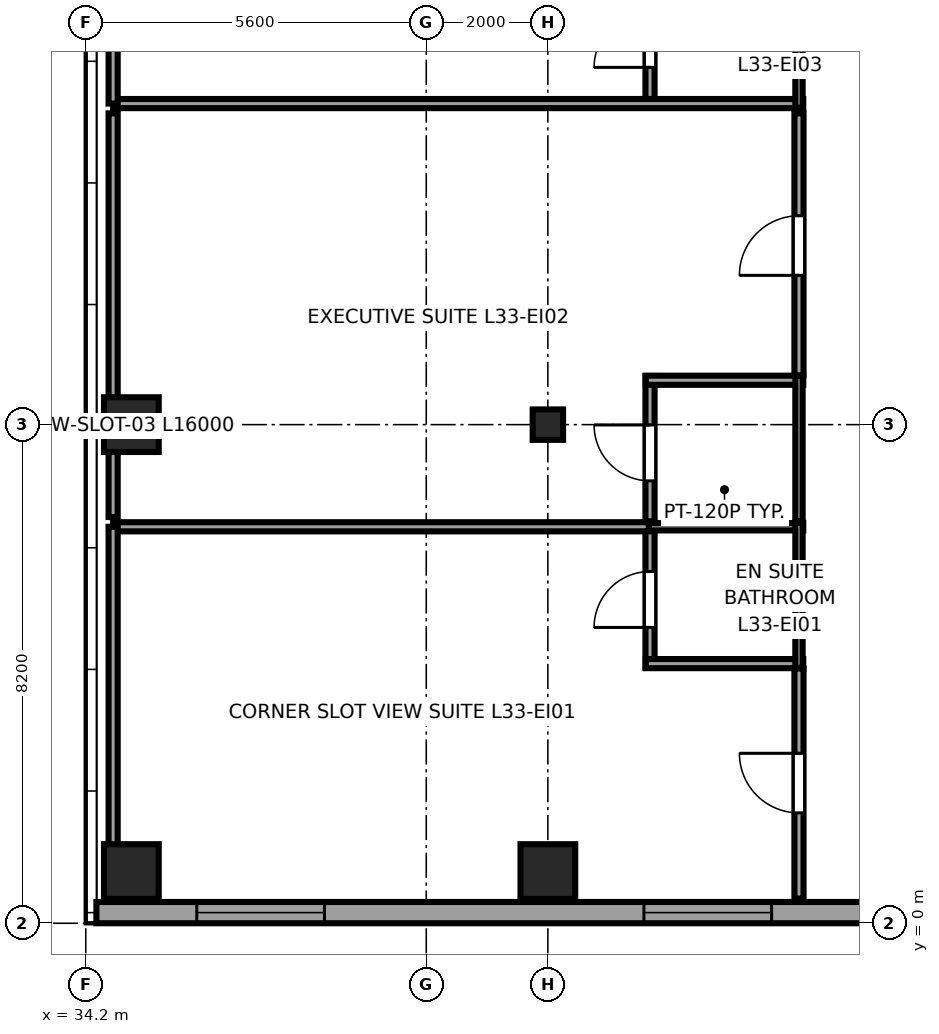
"""IFC4 building model, lengths in metres.
Left out: names, types, materials, properties, quantities, classifications, styles, units other than length and angle.
Written with IfcOpenShell. Run it as: python <this file> out.ifc"""

import sys

from ifc_helpers import new_model, si_unit, direction, frame, frame_2d, origin, origin_2d, place, context, subcontext, project, spatial, rectangle, i_section, extrude, source, transform, mapped, element, fill, save


model = new_model("IFC4")
c1 = context("Model", 3, precision=1e-05, world=origin(), true_north=direction((0.0, 1.0)))
c2 = subcontext(c1, "Body", "Model", "MODEL_VIEW")
j1 = project(units=[si_unit("LENGTHUNIT", "METRE"), si_unit("PLANEANGLEUNIT", "RADIAN")], contexts=[c1])
p1 = place(None, origin())
s1 = spatial("IfcSite", under=j1, at=p1, CompositionType="ELEMENT")
p2 = place(p1, origin())
s2 = spatial("IfcBuilding", under=s1, at=p2, CompositionType="ELEMENT")
p3 = place(p2, frame((0.0, 0.0, 129.3)))
s3 = spatial("IfcBuildingStorey", under=s2, at=p3, CompositionType="ELEMENT", Elevation=129.3)
m1 = source(origin(), c2, "Body", "SweptSolid", [
    extrude(rectangle(XDim=0.9, YDim=0.9, at=origin_2d()), origin(), (0.0, 0.0, 1.0), 3.55),
])
for number, where, z_axis, x_axis in (
    (1, (34.95, 0.85, 0.0), (0.0, 0.0, 1.0), (1.0, 0.0, 0.0)),
    (2, (34.95, 8.2, 0.0), (0.0, 0.0, 1.0), (1.0, 0.0, 0.0)),
    (3, (41.8, 0.85, 0.0), (0.0, 0.0, 1.0), (1.0, 0.0, 0.0)),
):
    element("IfcColumn", number, at=place(p3, frame(where, z_axis=z_axis, x_axis=x_axis)), inside=s3, PredefinedType="COLUMN", context=c2, shape_type="MappedRepresentation", body=[
        mapped(m1, transform((0.0, 0.0, 0.0), x_axis=(1.0, 0.0, 0.0), y_axis=(0.0, 1.0, 0.0), z_axis=(0.0, 0.0, 1.0), scale=1.0)),
    ])
m2 = source(origin(), c2, "Body", "SweptSolid", [
    extrude(i_section(OverallWidth=0.5, OverallDepth=0.5, WebThickness=0.022, FlangeThickness=0.034, at=origin_2d()), origin(), (0.0, 0.0, 1.0), 3.55),
])
p4 = place(p3, frame((41.8, 8.2, 0.0), z_axis=(0.0, 0.0, 1.0), x_axis=(1.0, 0.0, 0.0)))
e4 = element("IfcColumn", 4, at=p4, inside=s3, PredefinedType="COLUMN", context=c2, shape_type="MappedRepresentation", body=[
    mapped(m2, transform((0.0, 0.0, 0.0), x_axis=(1.0, 0.0, 0.0), y_axis=(0.0, 1.0, 0.0), z_axis=(0.0, 0.0, 1.0), scale=1.0)),
])
p5 = place(p3, frame((34.375, 0.175, 0.0), z_axis=(0.0, 0.0, 1.0), x_axis=(1.0, 0.0, 0.0)))
e5 = element("IfcWall", 5, at=p5, inside=s3, PredefinedType="SOLIDWALL", context=c2, shape_type="SweptSolid", body=[
    extrude(rectangle(XDim=18.008, YDim=0.35, at=frame_2d((9.004, 0.0))), origin(), (0.0, 0.0, 1.0), 3.37),
])
p6 = place(p5, frame((1.651, 0.0, 0.68)))
e6 = element("IfcOpeningElement", 6, at=p6, cuts=e5, PredefinedType="OPENING", context=c2, shape_type="SweptSolid", body=[
    extrude(rectangle(XDim=2.1, YDim=1.9, at=frame_2d((1.05, 0.95))), frame((0.0, 0.185, 0.0), z_axis=(0.0, -1.0, 0.0), x_axis=(1.0, 0.0, 0.0)), (0.0, 0.0, 1.0), 0.37),
])
p7 = place(p5, frame((9.005, 0.0, 0.68)))
e7 = element("IfcOpeningElement", 7, at=p7, cuts=e5, PredefinedType="OPENING", context=c2, shape_type="SweptSolid", body=[
    extrude(rectangle(XDim=2.1, YDim=1.9, at=frame_2d((1.05, 0.95))), frame((0.0, 0.185, 0.0), z_axis=(0.0, -1.0, 0.0), x_axis=(1.0, 0.0, 0.0)), (0.0, 0.0, 1.0), 0.37),
])
p8 = place(p5, frame((14.991, 0.0, 0.62)))
e8 = element("IfcOpeningElement", 8, at=p8, cuts=e5, PredefinedType="OPENING", context=c2, shape_type="SweptSolid", body=[
    extrude(rectangle(XDim=1.5, YDim=1.55, at=frame_2d((0.75, 0.775))), frame((0.0, 0.185, 0.0), z_axis=(0.0, -1.0, 0.0), x_axis=(1.0, 0.0, 0.0)), (0.0, 0.0, 1.0), 0.37),
])
p9 = place(p3, frame((43.48, 4.2, 0.0), z_axis=(0.0, 0.0, 1.0), x_axis=(0.0, 1.0, 0.0)))
e9 = element("IfcWall", 9, at=p9, inside=s3, PredefinedType="PARTITIONING", context=c2, shape_type="SweptSolid", body=[
    extrude(rectangle(XDim=2.39, YDim=0.15, at=frame_2d((1.195, 0.0))), origin(), (0.0, 0.0, 1.0), 3.37),
])
p10 = place(p9, frame((0.665, 0.0, 0.0)))
e10 = element("IfcOpeningElement", 10, at=p10, cuts=e9, PredefinedType="OPENING", context=c2, shape_type="SweptSolid", body=[
    extrude(rectangle(XDim=0.92, YDim=2.01, at=frame_2d((0.46, 1.005))), frame((0.0, 0.085, 0.0), z_axis=(0.0, -1.0, 0.0), x_axis=(1.0, 0.0, 0.0)), (0.0, 0.0, 1.0), 0.17),
])
p11 = place(p3, frame((43.41, 4.27, 0.0), z_axis=(0.0, 0.0, 1.0), x_axis=(1.0, 0.0, 0.0)))
e11 = element("IfcWall", 11, at=p11, inside=s3, PredefinedType="PARTITIONING", context=c2, shape_type="SweptSolid", body=[
    extrude(rectangle(XDim=2.59, YDim=0.15, at=frame_2d((1.295, 0.0))), origin(), (0.0, 0.0, 1.0), 3.37),
])
p12 = place(p3, frame((43.41, 6.52, 0.0), z_axis=(0.0, 0.0, 1.0), x_axis=(1.0, 0.0, 0.0)))
e12 = element("IfcWall", 12, at=p12, inside=s3, PredefinedType="PLUMBINGWALL", context=c2, shape_type="SweptSolid", body=[
    extrude(rectangle(XDim=2.59, YDim=0.12, at=frame_2d((1.295, 0.0))), origin(), (0.0, 0.0, 1.0), 3.37),
])
p13 = place(p3, frame((45.93, 4.2, 0.0), z_axis=(0.0, 0.0, 1.0), x_axis=(0.0, 1.0, 0.0)))
e13 = element("IfcWall", 13, at=p13, inside=s3, PredefinedType="PLUMBINGWALL", context=c2, shape_type="SweptSolid", body=[
    extrude(rectangle(XDim=2.39, YDim=0.12, at=frame_2d((1.195, 0.0))), origin(), (0.0, 0.0, 1.0), 3.37),
])
p14 = place(p3, frame((43.48, 6.61, 0.0), z_axis=(0.0, 0.0, 1.0), x_axis=(0.0, 1.0, 0.0)))
e14 = element("IfcWall", 14, at=p14, inside=s3, PredefinedType="PARTITIONING", context=c2, shape_type="SweptSolid", body=[
    extrude(rectangle(XDim=2.39, YDim=0.15, at=frame_2d((1.195, 0.0))), origin(), (0.0, 0.0, 1.0), 3.37),
])
p15 = place(p14, frame((0.665, 0.0, 0.0)))
e15 = element("IfcOpeningElement", 15, at=p15, cuts=e14, PredefinedType="OPENING", context=c2, shape_type="SweptSolid", body=[
    extrude(rectangle(XDim=0.92, YDim=2.01, at=frame_2d((0.46, 1.005))), frame((0.0, 0.085, 0.0), z_axis=(0.0, -1.0, 0.0), x_axis=(1.0, 0.0, 0.0)), (0.0, 0.0, 1.0), 0.17),
])
p16 = place(p3, frame((43.41, 8.93, 0.0), z_axis=(0.0, 0.0, 1.0), x_axis=(1.0, 0.0, 0.0)))
e16 = element("IfcWall", 16, at=p16, inside=s3, PredefinedType="PARTITIONING", context=c2, shape_type="SweptSolid", body=[
    extrude(rectangle(XDim=2.59, YDim=0.15, at=frame_2d((1.295, 0.0))), origin(), (0.0, 0.0, 1.0), 3.37),
])
p17 = place(p3, frame((45.93, 6.61, 0.0), z_axis=(0.0, 0.0, 1.0), x_axis=(0.0, 1.0, 0.0)))
e17 = element("IfcWall", 17, at=p17, inside=s3, PredefinedType="PLUMBINGWALL", context=c2, shape_type="SweptSolid", body=[
    extrude(rectangle(XDim=2.39, YDim=0.12, at=frame_2d((1.195, 0.0))), origin(), (0.0, 0.0, 1.0), 3.37),
])
p18 = place(p3, frame((43.48, 13.41, 0.0), z_axis=(0.0, 0.0, 1.0), x_axis=(0.0, 1.0, 0.0)))
e18 = element("IfcWall", 18, at=p18, inside=s3, PredefinedType="PARTITIONING", context=c2, shape_type="SweptSolid", body=[
    extrude(rectangle(XDim=2.39, YDim=0.15, at=frame_2d((1.195, 0.0))), origin(), (0.0, 0.0, 1.0), 3.37),
])
p19 = place(p18, frame((0.665, 0.0, 0.0)))
e19 = element("IfcOpeningElement", 19, at=p19, cuts=e18, PredefinedType="OPENING", context=c2, shape_type="SweptSolid", body=[
    extrude(rectangle(XDim=0.92, YDim=2.01, at=frame_2d((0.46, 1.005))), frame((0.0, 0.085, 0.0), z_axis=(0.0, -1.0, 0.0), x_axis=(1.0, 0.0, 0.0)), (0.0, 0.0, 1.0), 0.17),
])
p20 = place(p3, frame((34.65, 13.48, 0.0), z_axis=(0.0, 0.0, 1.0), x_axis=(1.0, 0.0, 0.0)))
e20 = element("IfcWall", 20, at=p20, inside=s3, PredefinedType="PARTITIONING", context=c2, shape_type="SweptSolid", body=[
    extrude(rectangle(XDim=11.35, YDim=0.15, at=frame_2d((5.675, 0.0))), origin(), (0.0, 0.0, 1.0), 3.37),
])
p21 = place(p3, frame((45.93, 13.41, 0.0), z_axis=(0.0, 0.0, 1.0), x_axis=(0.0, 1.0, 0.0)))
e21 = element("IfcWall", 21, at=p21, inside=s3, PredefinedType="PLUMBINGWALL", context=c2, shape_type="SweptSolid", body=[
    extrude(rectangle(XDim=2.39, YDim=0.12, at=frame_2d((1.195, 0.0))), origin(), (0.0, 0.0, 1.0), 3.37),
])
p22 = place(p3, frame((45.93, 0.405, 0.0), z_axis=(0.0, 0.0, 1.0), x_axis=(0.0, 1.0, 0.0)))
e22 = element("IfcWall", 22, at=p22, inside=s3, PredefinedType="PARTITIONING", context=c2, shape_type="SweptSolid", body=[
    extrude(rectangle(XDim=3.785, YDim=0.15, at=frame_2d((1.893, 0.0))), origin(), (0.0, 0.0, 1.0), 3.37),
])
p23 = place(p22, frame((1.41, 0.0, 0.0)))
e23 = element("IfcOpeningElement", 23, at=p23, cuts=e22, PredefinedType="OPENING", context=c2, shape_type="SweptSolid", body=[
    extrude(rectangle(XDim=0.98, YDim=2.12, at=frame_2d((0.49, 1.06))), frame((0.0, 0.085, 0.0), z_axis=(0.0, -1.0, 0.0), x_axis=(1.0, 0.0, 0.0)), (0.0, 0.0, 1.0), 0.17),
])
p24 = place(p3, frame((34.65, 6.52, 0.0), z_axis=(0.0, 0.0, 1.0), x_axis=(1.0, 0.0, 0.0)))
e24 = element("IfcWall", 24, at=p24, inside=s3, PredefinedType="PARTITIONING", context=c2, shape_type="SweptSolid", body=[
    extrude(rectangle(XDim=8.81, YDim=0.15, at=frame_2d((4.405, 0.0))), origin(), (0.0, 0.0, 1.0), 3.37),
])
p25 = place(p3, frame((34.65, 0.405, 0.0), z_axis=(0.0, 0.0, 1.0), x_axis=(0.0, 1.0, 0.0)))
e25 = element("IfcWall", 25, at=p25, inside=s3, PredefinedType="PARTITIONING", context=c2, shape_type="SweptSolid", body=[
    extrude(rectangle(XDim=6.115, YDim=0.15, at=frame_2d((3.058, 0.0))), origin(), (0.0, 0.0, 1.0), 3.37),
])
p26 = place(p3, frame((45.93, 9.01, 0.0), z_axis=(0.0, 0.0, 1.0), x_axis=(0.0, 1.0, 0.0)))
e26 = element("IfcWall", 26, at=p26, inside=s3, PredefinedType="PARTITIONING", context=c2, shape_type="SweptSolid", body=[
    extrude(rectangle(XDim=4.31, YDim=0.15, at=frame_2d((2.155, 0.0))), origin(), (0.0, 0.0, 1.0), 3.37),
])
p27 = place(p26, frame((1.645, 0.0, 0.0)))
e27 = element("IfcOpeningElement", 27, at=p27, cuts=e26, PredefinedType="OPENING", context=c2, shape_type="SweptSolid", body=[
    extrude(rectangle(XDim=0.98, YDim=2.12, at=frame_2d((0.49, 1.06))), frame((0.0, 0.085, 0.0), z_axis=(0.0, -1.0, 0.0), x_axis=(1.0, 0.0, 0.0)), (0.0, 0.0, 1.0), 0.17),
])
p28 = place(p3, frame((34.65, 6.68, 0.0), z_axis=(0.0, 0.0, 1.0), x_axis=(0.0, 1.0, 0.0)))
e28 = element("IfcWall", 28, at=p28, inside=s3, PredefinedType="PARTITIONING", context=c2, shape_type="SweptSolid", body=[
    extrude(rectangle(XDim=6.64, YDim=0.15, at=frame_2d((3.32, 0.0))), origin(), (0.0, 0.0, 1.0), 3.37),
])
p29 = place(p3, frame((34.65, 13.48, 0.0), z_axis=(0.0, 0.0, 1.0), x_axis=(0.0, 1.0, 0.0)))
e29 = element("IfcWall", 29, at=p29, inside=s3, PredefinedType="PARTITIONING", context=c2, shape_type="SweptSolid", body=[
    extrude(rectangle(XDim=6.54, YDim=0.15, at=frame_2d((3.27, 0.0))), origin(), (0.0, 0.0, 1.0), 3.37),
])
m3 = source(origin(), c2, "Body", "SweptSolid", [
    extrude(rectangle(XDim=2.1, YDim=1.9, at=frame_2d((1.05, 0.95))), frame((0.0, 0.09, 0.0), z_axis=(0.0, -1.0, 0.0), x_axis=(1.0, 0.0, 0.0)), (0.0, 0.0, 1.0), 0.06),
])
p30 = place(p6, origin())
e30 = element("IfcWindow", 30, at=p30, inside=s3, PartitioningType="TRIPLE_PANEL_HORIZONTAL", PredefinedType="WINDOW", context=c2, shape_type="MappedRepresentation", body=[
    mapped(m3, transform((0.0, 0.0, 0.0), x_axis=(1.0, 0.0, 0.0), y_axis=(0.0, 1.0, 0.0), z_axis=(0.0, 0.0, 1.0), scale=1.0)),
])
fill(e6, e30)
p31 = place(p7, origin())
e31 = element("IfcWindow", 31, at=p31, inside=s3, PartitioningType="TRIPLE_PANEL_HORIZONTAL", PredefinedType="WINDOW", context=c2, shape_type="MappedRepresentation", body=[
    mapped(m3, transform((0.0, 0.0, 0.0), x_axis=(1.0, 0.0, 0.0), y_axis=(0.0, 1.0, 0.0), z_axis=(0.0, 0.0, 1.0), scale=1.0)),
])
fill(e7, e31)
m4 = source(origin(), c2, "Body", "SweptSolid", [
    extrude(rectangle(XDim=0.92, YDim=2.01, at=frame_2d((0.46, 1.005))), frame((0.0, 0.025, 0.0), z_axis=(0.0, -1.0, 0.0), x_axis=(1.0, 0.0, 0.0)), (0.0, 0.0, 1.0), 0.05),
])
p32 = place(p10, origin())
e32 = element("IfcDoor", 32, at=p32, inside=s3, OperationType="SINGLE_SWING_LEFT", PredefinedType="DOOR", context=c2, shape_type="MappedRepresentation", body=[
    mapped(m4, transform((0.0, 0.0, 0.0), x_axis=(1.0, 0.0, 0.0), y_axis=(0.0, 1.0, 0.0), z_axis=(0.0, 0.0, 1.0), scale=1.0)),
])
fill(e10, e32)
p33 = place(p15, origin())
e33 = element("IfcDoor", 33, at=p33, inside=s3, OperationType="SINGLE_SWING_RIGHT", PredefinedType="DOOR", context=c2, shape_type="MappedRepresentation", body=[
    mapped(m4, transform((0.0, 0.0, 0.0), x_axis=(1.0, 0.0, 0.0), y_axis=(0.0, 1.0, 0.0), z_axis=(0.0, 0.0, 1.0), scale=1.0)),
])
fill(e15, e33)
p34 = place(p19, origin())
e34 = element("IfcDoor", 34, at=p34, inside=s3, OperationType="SINGLE_SWING_LEFT", PredefinedType="DOOR", context=c2, shape_type="MappedRepresentation", body=[
    mapped(m4, transform((0.0, 0.0, 0.0), x_axis=(1.0, 0.0, 0.0), y_axis=(0.0, 1.0, 0.0), z_axis=(0.0, 0.0, 1.0), scale=1.0)),
])
fill(e19, e34)
m5 = source(origin(), c2, "Body", "SweptSolid", [
    extrude(rectangle(XDim=0.98, YDim=2.12, at=frame_2d((0.49, 1.06))), frame((0.0, 0.025, 0.0), z_axis=(0.0, -1.0, 0.0), x_axis=(1.0, 0.0, 0.0)), (0.0, 0.0, 1.0), 0.05),
])
p35 = place(p23, origin())
e35 = element("IfcDoor", 35, at=p35, inside=s3, OperationType="SINGLE_SWING_RIGHT", PredefinedType="DOOR", context=c2, shape_type="MappedRepresentation", body=[
    mapped(m5, transform((0.0, 0.0, 0.0), x_axis=(1.0, 0.0, 0.0), y_axis=(0.0, 1.0, 0.0), z_axis=(0.0, 0.0, 1.0), scale=1.0)),
])
fill(e23, e35)
p36 = place(p27, origin())
e36 = element("IfcDoor", 36, at=p36, inside=s3, OperationType="SINGLE_SWING_LEFT", PredefinedType="DOOR", context=c2, shape_type="MappedRepresentation", body=[
    mapped(m5, transform((0.0, 0.0, 0.0), x_axis=(1.0, 0.0, 0.0), y_axis=(0.0, 1.0, 0.0), z_axis=(0.0, 0.0, 1.0), scale=1.0)),
])
fill(e27, e36)
save(model, sys.argv[1])
